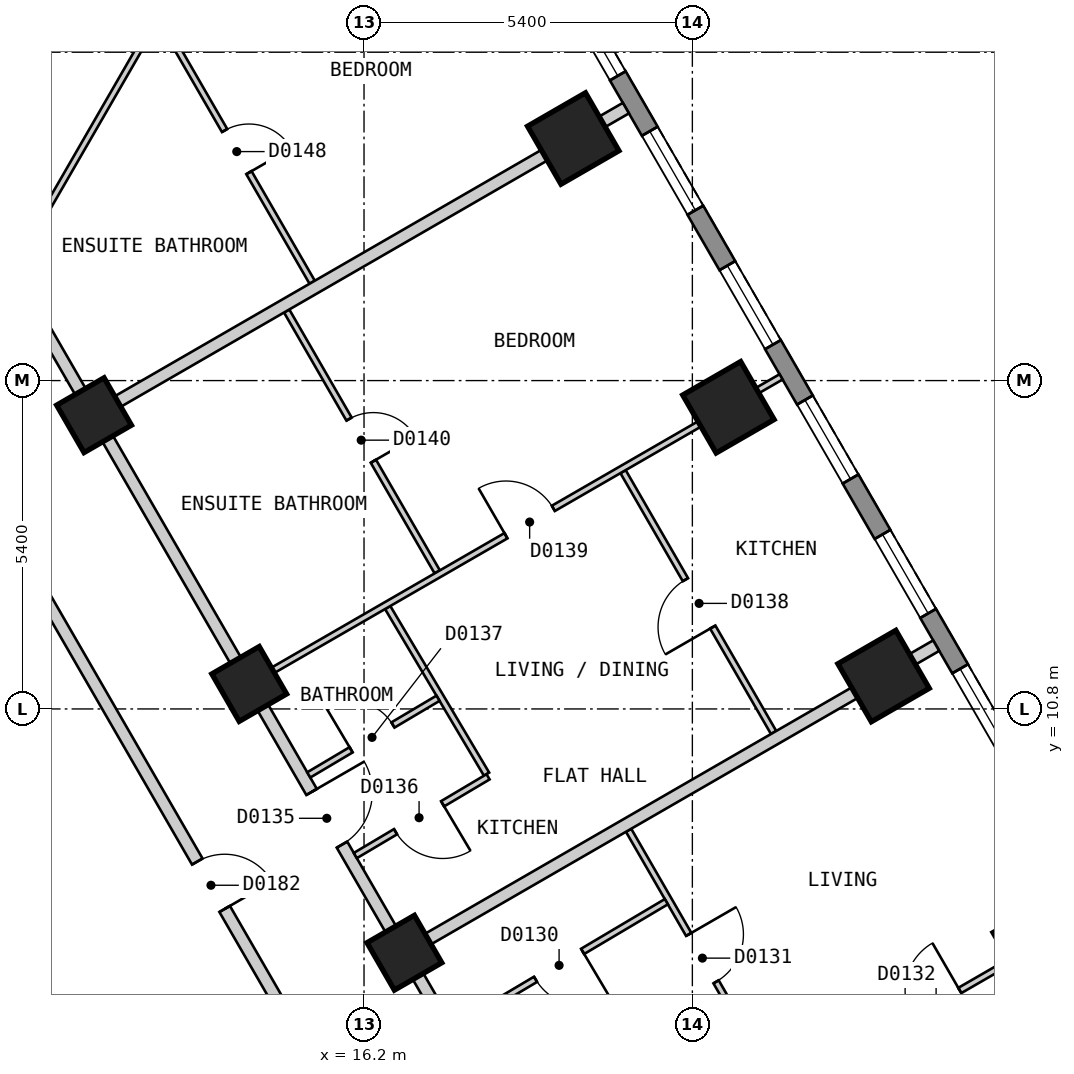
"""IFC4 building model, lengths in metres.
Left out: names, types, materials, properties, quantities, classifications, styles, units other than length and angle.
Written with IfcOpenShell. Run it as: python <this file> out.ifc"""

import sys

from ifc_helpers import new_model, si_unit, direction, frame, frame_2d, origin, origin_2d, place, context, subcontext, project, spatial, polyline, rectangle, outline, extrude, element, fill, save


model = new_model("IFC4")
c1 = context("Model", 3, precision=1e-05, world=origin(), true_north=direction((0.0, 1.0)))
c2 = subcontext(c1, "Body", "Model", "MODEL_VIEW")
j1 = project(units=[si_unit("LENGTHUNIT", "METRE"), si_unit("PLANEANGLEUNIT", "RADIAN")], contexts=[c1])
p1 = place(None, origin())
s1 = spatial("IfcSite", under=j1, at=p1, CompositionType="ELEMENT")
p2 = place(p1, origin())
s2 = spatial("IfcBuilding", under=s1, at=p2, CompositionType="ELEMENT")
p3 = place(p2, frame((0.0, 0.0, 29.4)))
s3 = spatial("IfcBuildingStorey", under=s2, at=p3, CompositionType="ELEMENT", Elevation=29.4)
for number, where, z_axis, x_axis in (
    (1, (27.297, 6.921, 0.0), (0.0, 0.0, 1.0), (-0.5, 0.866, 0.0)),
    (2, (24.745, 11.341, 0.0), (0.0, 0.0, 1.0), (-0.5, 0.866, 0.0)),
    (3, (22.193, 15.761, 0.0), (0.0, 0.0, 1.0), (-0.5, 0.866, 0.0)),
    (4, (19.641, 20.181, 0.0), (0.0, 0.0, 1.0), (-0.5, 0.866, 0.0)),
):
    element("IfcColumn", number, at=place(p3, frame(where, z_axis=z_axis, x_axis=x_axis)), inside=s3, PredefinedType="COLUMN", context=c2, shape_type="SweptSolid", body=[
        extrude(rectangle(XDim=1.1, YDim=1.1, at=origin_2d()), origin(), (0.0, 0.0, 1.0), 3.0),
    ])
for number, where, z_axis, x_axis in (
    (5, (16.864, 6.791, 0.0), (0.0, 0.0, 1.0), (-0.5, 0.866, 0.0)),
    (6, (14.312, 11.211, 0.0), (0.0, 0.0, 1.0), (-0.5, 0.866, 0.0)),
    (7, (11.76, 15.631, 0.0), (0.0, 0.0, 1.0), (-0.5, 0.866, 0.0)),
):
    element("IfcColumn", number, at=place(p3, frame(where, z_axis=z_axis, x_axis=x_axis)), inside=s3, PredefinedType="COLUMN", context=c2, shape_type="SweptSolid", body=[
        extrude(rectangle(XDim=0.9, YDim=0.9, at=origin_2d()), origin(), (0.0, 0.0, 1.0), 3.0),
    ])
p4 = place(p3, frame((31.22, 2.425, 0.0), z_axis=(0.0, 0.0, 1.0), x_axis=(-0.500001938803, 0.866024284413, 0.0)))
e8 = element("IfcWall", 8, at=p4, inside=s3, PredefinedType="SOLIDWALL", context=c2, shape_type="SweptSolid", body=[
    extrude(outline(polyline([(0.0, -0.15), (27.02, -0.15), (26.94, 0.15), (0.08, 0.15), (0.0, -0.15)])), origin(), (0.0, 0.0, 1.0), 2.7),
])
p5 = place(p4, frame((1.277, 0.0, 0.15)))
e9 = element("IfcOpeningElement", 9, at=p5, cuts=e8, PredefinedType="OPENING", context=c2, shape_type="SweptSolid", body=[
    extrude(rectangle(XDim=1.5, YDim=2.1, at=frame_2d((0.75, 1.05))), frame((0.0, 0.16, 0.0), z_axis=(0.0, -1.0, 0.0), x_axis=(1.0, 0.0, 0.0)), (0.0, 0.0, 1.0), 0.32),
])
p6 = place(p4, frame((3.829, 0.0, 0.15)))
e10 = element("IfcOpeningElement", 10, at=p6, cuts=e8, PredefinedType="OPENING", context=c2, shape_type="SweptSolid", body=[
    extrude(rectangle(XDim=1.5, YDim=2.1, at=frame_2d((0.75, 1.05))), frame((0.0, 0.16, 0.0), z_axis=(0.0, -1.0, 0.0), x_axis=(1.0, 0.0, 0.0)), (0.0, 0.0, 1.0), 0.32),
])
p7 = place(p4, frame((6.382, 0.0, 0.15)))
e11 = element("IfcOpeningElement", 11, at=p7, cuts=e8, PredefinedType="OPENING", context=c2, shape_type="SweptSolid", body=[
    extrude(rectangle(XDim=1.5, YDim=2.1, at=frame_2d((0.75, 1.05))), frame((0.0, 0.16, 0.0), z_axis=(0.0, -1.0, 0.0), x_axis=(1.0, 0.0, 0.0)), (0.0, 0.0, 1.0), 0.32),
])
p8 = place(p4, frame((8.933, 0.0, 0.15)))
e12 = element("IfcOpeningElement", 12, at=p8, cuts=e8, PredefinedType="OPENING", context=c2, shape_type="SweptSolid", body=[
    extrude(rectangle(XDim=1.5, YDim=2.1, at=frame_2d((0.75, 1.05))), frame((0.0, 0.16, 0.0), z_axis=(0.0, -1.0, 0.0), x_axis=(1.0, 0.0, 0.0)), (0.0, 0.0, 1.0), 0.32),
])
p9 = place(p4, frame((11.485, 0.0, 0.15)))
e13 = element("IfcOpeningElement", 13, at=p9, cuts=e8, PredefinedType="OPENING", context=c2, shape_type="SweptSolid", body=[
    extrude(rectangle(XDim=1.5, YDim=2.1, at=frame_2d((0.75, 1.05))), frame((0.0, 0.16, 0.0), z_axis=(0.0, -1.0, 0.0), x_axis=(1.0, 0.0, 0.0)), (0.0, 0.0, 1.0), 0.32),
])
p10 = place(p4, frame((14.037, 0.0, 0.15)))
e14 = element("IfcOpeningElement", 14, at=p10, cuts=e8, PredefinedType="OPENING", context=c2, shape_type="SweptSolid", body=[
    extrude(rectangle(XDim=1.5, YDim=2.1, at=frame_2d((0.75, 1.05))), frame((0.0, 0.16, 0.0), z_axis=(0.0, -1.0, 0.0), x_axis=(1.0, 0.0, 0.0)), (0.0, 0.0, 1.0), 0.32),
])
p11 = place(p4, frame((16.589, 0.0, 0.15)))
e15 = element("IfcOpeningElement", 15, at=p11, cuts=e8, PredefinedType="OPENING", context=c2, shape_type="SweptSolid", body=[
    extrude(rectangle(XDim=1.5, YDim=2.1, at=frame_2d((0.75, 1.05))), frame((0.0, 0.16, 0.0), z_axis=(0.0, -1.0, 0.0), x_axis=(1.0, 0.0, 0.0)), (0.0, 0.0, 1.0), 0.32),
])
p12 = place(p4, frame((19.141, 0.0, 0.15)))
e16 = element("IfcOpeningElement", 16, at=p12, cuts=e8, PredefinedType="OPENING", context=c2, shape_type="SweptSolid", body=[
    extrude(rectangle(XDim=1.5, YDim=2.1, at=frame_2d((0.75, 1.05))), frame((0.0, 0.16, 0.0), z_axis=(0.0, -1.0, 0.0), x_axis=(1.0, 0.0, 0.0)), (0.0, 0.0, 1.0), 0.32),
])
p13 = place(p4, frame((21.693, 0.0, 0.15)))
e17 = element("IfcOpeningElement", 17, at=p13, cuts=e8, PredefinedType="OPENING", context=c2, shape_type="SweptSolid", body=[
    extrude(rectangle(XDim=1.5, YDim=2.1, at=frame_2d((0.75, 1.05))), frame((0.0, 0.16, 0.0), z_axis=(0.0, -1.0, 0.0), x_axis=(1.0, 0.0, 0.0)), (0.0, 0.0, 1.0), 0.32),
])
p14 = place(p4, frame((24.244, 0.0, 0.15)))
e18 = element("IfcOpeningElement", 18, at=p14, cuts=e8, PredefinedType="OPENING", context=c2, shape_type="SweptSolid", body=[
    extrude(rectangle(XDim=1.5, YDim=2.1, at=frame_2d((0.75, 1.05))), frame((0.0, 0.16, 0.0), z_axis=(0.0, -1.0, 0.0), x_axis=(1.0, 0.0, 0.0)), (0.0, 0.0, 1.0), 0.32),
])
p15 = place(p3, frame((9.18, 15.7, 0.0), z_axis=(0.0, 0.0, 1.0), x_axis=(0.500003652032, -0.866023295272, 0.0)))
e19 = element("IfcWall", 19, at=p15, inside=s3, PredefinedType="PARTITIONING", context=c2, shape_type="SweptSolid", body=[
    extrude(rectangle(XDim=18.012, YDim=0.2, at=frame_2d((9.006, 0.0))), origin(), (0.0, 0.0, 1.0), 2.7),
])
p16 = place(p15, frame((8.556, 0.0, 0.0)))
e20 = element("IfcOpeningElement", 20, at=p16, cuts=e19, PredefinedType="OPENING", context=c2, shape_type="SweptSolid", body=[
    extrude(rectangle(XDim=0.9, YDim=2.1, at=frame_2d((0.45, 1.05))), frame((0.0, 0.11, 0.0), z_axis=(0.0, -1.0, 0.0), x_axis=(1.0, 0.0, 0.0)), (0.0, 0.0, 1.0), 0.22),
])
p17 = place(p3, frame((10.45, 17.9, 0.0), z_axis=(0.0, 0.0, 1.0), x_axis=(0.500034352617, -0.866005569383, 0.0)))
e21 = element("IfcWall", 21, at=p17, inside=s3, PredefinedType="PARTITIONING", context=c2, shape_type="SweptSolid", body=[
    extrude(rectangle(XDim=20.553, YDim=0.2, at=frame_2d((10.276, 0.0))), origin(), (0.0, 0.0, 1.0), 2.7),
])
p18 = place(p17, frame((14.903, 0.0, 0.0)))
e22 = element("IfcOpeningElement", 22, at=p18, cuts=e21, PredefinedType="OPENING", context=c2, shape_type="SweptSolid", body=[
    extrude(rectangle(XDim=1.0, YDim=2.1, at=frame_2d((0.5, 1.05))), frame((0.0, 0.11, 0.0), z_axis=(0.0, -1.0, 0.0), x_axis=(1.0, 0.0, 0.0)), (0.0, 0.0, 1.0), 0.22),
])
p19 = place(p17, frame((9.775, 0.0, 0.0)))
e23 = element("IfcOpeningElement", 23, at=p19, cuts=e21, PredefinedType="OPENING", context=c2, shape_type="SweptSolid", body=[
    extrude(rectangle(XDim=1.0, YDim=2.1, at=frame_2d((0.5, 1.05))), frame((0.0, 0.11, 0.0), z_axis=(0.0, -1.0, 0.0), x_axis=(1.0, 0.0, 0.0)), (0.0, 0.0, 1.0), 0.22),
])
p20 = place(p3, frame((16.589, 12.468, 0.0), z_axis=(0.0, 0.0, 1.0), x_axis=(0.510331599186, -0.859977708358, 0.0)))
e24 = element("IfcWall", 24, at=p20, inside=s3, PredefinedType="PARTITIONING", context=c2, shape_type="SweptSolid", body=[
    extrude(rectangle(XDim=3.186, YDim=0.1, at=frame_2d((1.593, 0.0))), origin(), (0.0, 0.0, 1.0), 2.7),
])
p21 = place(p3, frame((14.928, 17.344, 0.0), z_axis=(0.0, 0.0, 1.0), x_axis=(0.499881743012, -0.866093668724, 0.0)))
e25 = element("IfcWall", 25, at=p21, inside=s3, PredefinedType="PARTITIONING", context=c2, shape_type="SweptSolid", body=[
    extrude(rectangle(XDim=4.953, YDim=0.1, at=frame_2d((2.477, 0.0))), origin(), (0.0, 0.0, 1.0), 2.7),
])
p22 = place(p21, frame((2.052, 0.0, 0.0)))
e26 = element("IfcOpeningElement", 26, at=p22, cuts=e25, PredefinedType="OPENING", context=c2, shape_type="SweptSolid", body=[
    extrude(rectangle(XDim=0.8, YDim=2.1, at=frame_2d((0.4, 1.05))), frame((0.0, 0.06, 0.0), z_axis=(0.0, -1.0, 0.0), x_axis=(1.0, 0.0, 0.0)), (0.0, 0.0, 1.0), 0.12),
])
p23 = place(p3, frame((12.846, 22.15, 0.0), z_axis=(0.0, 0.0, 1.0), x_axis=(0.500002715276, -0.866023836113, 0.0)))
e27 = element("IfcWall", 27, at=p23, inside=s3, PredefinedType="PARTITIONING", context=c2, shape_type="SweptSolid", body=[
    extrude(rectangle(XDim=5.002, YDim=0.1, at=frame_2d((2.501, 0.0))), origin(), (0.0, 0.0, 1.0), 2.7),
])
p24 = place(p23, frame((2.122, 0.0, 0.0)))
e28 = element("IfcOpeningElement", 28, at=p24, cuts=e27, PredefinedType="OPENING", context=c2, shape_type="SweptSolid", body=[
    extrude(rectangle(XDim=0.8, YDim=2.1, at=frame_2d((0.4, 1.05))), frame((0.0, 0.06, 0.0), z_axis=(0.0, -1.0, 0.0), x_axis=(1.0, 0.0, 0.0)), (0.0, 0.0, 1.0), 0.12),
])
p25 = place(p3, frame((20.551, 8.805, 0.0), z_axis=(0.0, 0.0, 1.0), x_axis=(0.499984387913, -0.86603441724, 0.0)))
e29 = element("IfcWall", 29, at=p25, inside=s3, PredefinedType="PARTITIONING", context=c2, shape_type="SweptSolid", body=[
    extrude(rectangle(XDim=10.058, YDim=0.1, at=frame_2d((5.029, 0.0))), origin(), (0.0, 0.0, 1.0), 2.7),
])
p26 = place(p25, frame((1.978, 0.0, 0.0)))
e30 = element("IfcOpeningElement", 30, at=p26, cuts=e29, PredefinedType="OPENING", context=c2, shape_type="SweptSolid", body=[
    extrude(rectangle(XDim=0.9, YDim=2.1, at=frame_2d((0.45, 1.05))), frame((0.0, 0.06, 0.0), z_axis=(0.0, -1.0, 0.0), x_axis=(1.0, 0.0, 0.0)), (0.0, 0.0, 1.0), 0.12),
])
p27 = place(p25, frame((7.157, 0.0, 0.0)))
e31 = element("IfcOpeningElement", 31, at=p27, cuts=e29, PredefinedType="OPENING", context=c2, shape_type="SweptSolid", body=[
    extrude(rectangle(XDim=0.8, YDim=2.1, at=frame_2d((0.4, 1.05))), frame((0.0, 0.06, 0.0), z_axis=(0.0, -1.0, 0.0), x_axis=(1.0, 0.0, 0.0)), (0.0, 0.0, 1.0), 0.12),
])
p28 = place(p3, frame((20.46, 14.703, 0.0), z_axis=(0.0, 0.0, 1.0), x_axis=(0.499903082856, -0.866081351693, 0.0)))
e32 = element("IfcWall", 32, at=p28, inside=s3, PredefinedType="PARTITIONING", context=c2, shape_type="SweptSolid", body=[
    extrude(rectangle(XDim=4.953, YDim=0.1, at=frame_2d((2.477, 0.0))), origin(), (0.0, 0.0, 1.0), 2.7),
])
p29 = place(p28, frame((2.052, 0.0, 0.0)))
e33 = element("IfcOpeningElement", 33, at=p29, cuts=e32, PredefinedType="OPENING", context=c2, shape_type="SweptSolid", body=[
    extrude(rectangle(XDim=0.9, YDim=2.1, at=frame_2d((0.45, 1.05))), frame((0.0, 0.06, 0.0), z_axis=(0.0, -1.0, 0.0), x_axis=(1.0, 0.0, 0.0)), (0.0, 0.0, 1.0), 0.12),
])
p30 = place(p3, frame((10.393, 18.0, 0.0), z_axis=(0.0, 0.0, 1.0), x_axis=(0.499945497007, 0.866056868816, 0.0)))
e34 = element("IfcWall", 34, at=p30, inside=s3, PredefinedType="PARTITIONING", context=c2, shape_type="SweptSolid", body=[
    extrude(rectangle(XDim=10.265, YDim=0.1, at=frame_2d((5.132, 0.0))), origin(), (0.0, 0.0, 1.0), 2.7),
])
p31 = place(p30, frame((7.108, 0.0, 0.0)))
e35 = element("IfcOpeningElement", 35, at=p31, cuts=e34, PredefinedType="OPENING", context=c2, shape_type="SweptSolid", body=[
    extrude(rectangle(XDim=0.9, YDim=2.1, at=frame_2d((0.45, 1.05))), frame((0.0, 0.06, 0.0), z_axis=(0.0, -1.0, 0.0), x_axis=(1.0, 0.0, 0.0)), (0.0, 0.0, 1.0), 0.12),
])
p32 = place(p3, frame((14.399, 11.261, 0.0), z_axis=(0.0, 0.0, 1.0), x_axis=(0.866022959057, 0.500004234368, 0.0)))
e36 = element("IfcWall", 36, at=p32, inside=s3, PredefinedType="PARTITIONING", context=c2, shape_type="SweptSolid", body=[
    extrude(rectangle(XDim=10.0, YDim=0.1, at=frame_2d((5.0, 0.0))), origin(), (0.0, 0.0, 1.0), 2.7),
])
p33 = place(p32, frame((4.775, 0.0, 0.0)))
e37 = element("IfcOpeningElement", 37, at=p33, cuts=e36, PredefinedType="OPENING", context=c2, shape_type="SweptSolid", body=[
    extrude(rectangle(XDim=0.9, YDim=2.1, at=frame_2d((0.45, 1.05))), frame((0.0, 0.06, 0.0), z_axis=(0.0, -1.0, 0.0), x_axis=(1.0, 0.0, 0.0)), (0.0, 0.0, 1.0), 0.12),
])
p34 = place(p3, frame((17.688, 5.563, 0.0), z_axis=(0.0, 0.0, 1.0), x_axis=(0.860050619918, 0.510208713351, 0.0)))
e38 = element("IfcWall", 38, at=p34, inside=s3, PredefinedType="PARTITIONING", context=c2, shape_type="SweptSolid", body=[
    extrude(rectangle(XDim=4.051, YDim=0.1, at=frame_2d((2.025, 0.0))), origin(), (0.0, 0.0, 1.0), 2.7),
])
p35 = place(p34, frame((1.55, 0.0, 0.0)))
e39 = element("IfcOpeningElement", 39, at=p35, cuts=e38, PredefinedType="OPENING", context=c2, shape_type="SweptSolid", body=[
    extrude(rectangle(XDim=0.9, YDim=2.1, at=frame_2d((0.45, 1.05))), frame((0.0, 0.06, 0.0), z_axis=(0.0, -1.0, 0.0), x_axis=(1.0, 0.0, 0.0)), (0.0, 0.0, 1.0), 0.12),
])
p36 = place(p3, frame((16.057, 8.389, 0.0), z_axis=(0.0, 0.0, 1.0), x_axis=(0.860036770423, 0.510232058499, 0.0)))
e40 = element("IfcWall", 40, at=p36, inside=s3, PredefinedType="PARTITIONING", context=c2, shape_type="SweptSolid", body=[
    extrude(rectangle(XDim=2.538, YDim=0.1, at=frame_2d((1.269, 0.0))), origin(), (0.0, 0.0, 1.0), 2.7),
])
p37 = place(p36, frame((0.769, 0.0, 0.0)))
e41 = element("IfcOpeningElement", 41, at=p37, cuts=e40, PredefinedType="OPENING", context=c2, shape_type="SweptSolid", body=[
    extrude(rectangle(XDim=0.9, YDim=2.1, at=frame_2d((0.45, 1.05))), frame((0.0, 0.06, 0.0), z_axis=(0.0, -1.0, 0.0), x_axis=(1.0, 0.0, 0.0)), (0.0, 0.0, 1.0), 0.12),
])
p38 = place(p3, frame((15.291, 9.715, 0.0), z_axis=(0.0, 0.0, 1.0), x_axis=(0.860087708271, 0.510146188932, 0.0)))
e42 = element("IfcWall", 42, at=p38, inside=s3, PredefinedType="PARTITIONING", context=c2, shape_type="SweptSolid", body=[
    extrude(rectangle(XDim=2.472, YDim=0.1, at=frame_2d((1.236, 0.0))), origin(), (0.0, 0.0, 1.0), 2.7),
])
p39 = place(p38, frame((0.81, 0.0, 0.0)))
e43 = element("IfcOpeningElement", 43, at=p39, cuts=e42, PredefinedType="OPENING", context=c2, shape_type="SweptSolid", body=[
    extrude(rectangle(XDim=0.8, YDim=2.1, at=frame_2d((0.4, 1.05))), frame((0.0, 0.06, 0.0), z_axis=(0.0, -1.0, 0.0), x_axis=(1.0, 0.0, 0.0)), (0.0, 0.0, 1.0), 0.12),
])
for number, where, z_axis, x_axis in (
    (44, (16.95, 6.841, 0.0), (0.0, 0.0, 1.0), (0.866, 0.5, 0.0)),
    (45, (11.847, 15.681, 0.0), (0.0, 0.0, 1.0), (0.866, 0.5, 0.0)),
):
    element("IfcWall", number, at=place(p3, frame(where, z_axis=z_axis, x_axis=x_axis)), inside=s3, PredefinedType="PARTITIONING", context=c2, shape_type="SweptSolid", body=[
        extrude(rectangle(XDim=10.0, YDim=0.2, at=frame_2d((5.0, 0.0))), origin(), (0.0, 0.0, 1.0), 2.7),
    ])
p40 = place(p3, frame((23.053, 4.47, 0.0), z_axis=(0.0, 0.0, 1.0), x_axis=(0.866052608538, 0.499952877023, 0.0)))
e46 = element("IfcWall", 46, at=p40, inside=s3, PredefinedType="PARTITIONING", context=c2, shape_type="SweptSolid", body=[
    extrude(rectangle(XDim=5.9, YDim=0.1, at=frame_2d((2.95, 0.0))), origin(), (0.0, 0.0, 1.0), 2.7),
])
p41 = place(p40, frame((2.501, 0.0, 0.0)))
e47 = element("IfcOpeningElement", 47, at=p41, cuts=e46, PredefinedType="OPENING", context=c2, shape_type="SweptSolid", body=[
    extrude(rectangle(XDim=0.9, YDim=2.1, at=frame_2d((0.45, 1.05))), frame((0.0, 0.06, 0.0), z_axis=(0.0, -1.0, 0.0), x_axis=(1.0, 0.0, 0.0)), (0.0, 0.0, 1.0), 0.12),
])
p42 = place(p8, origin())
e48 = element("IfcWindow", 48, at=p42, inside=s3, PartitioningType="SINGLE_PANEL", PredefinedType="WINDOW", context=c2, shape_type="SweptSolid", body=[
    extrude(rectangle(XDim=1.5, YDim=2.1, at=frame_2d((0.75, 1.05))), frame((0.0, 0.03, 0.0), z_axis=(0.0, -1.0, 0.0), x_axis=(1.0, 0.0, 0.0)), (0.0, 0.0, 1.0), 0.06),
])
fill(e12, e48)
p43 = place(p9, origin())
e49 = element("IfcWindow", 49, at=p43, inside=s3, PartitioningType="SINGLE_PANEL", PredefinedType="WINDOW", context=c2, shape_type="SweptSolid", body=[
    extrude(rectangle(XDim=1.5, YDim=2.1, at=frame_2d((0.75, 1.05))), frame((0.0, 0.03, 0.0), z_axis=(0.0, -1.0, 0.0), x_axis=(1.0, 0.0, 0.0)), (0.0, 0.0, 1.0), 0.06),
])
fill(e13, e49)
p44 = place(p10, origin())
e50 = element("IfcWindow", 50, at=p44, inside=s3, PartitioningType="SINGLE_PANEL", PredefinedType="WINDOW", context=c2, shape_type="SweptSolid", body=[
    extrude(rectangle(XDim=1.5, YDim=2.1, at=frame_2d((0.75, 1.05))), frame((0.0, 0.03, 0.0), z_axis=(0.0, -1.0, 0.0), x_axis=(1.0, 0.0, 0.0)), (0.0, 0.0, 1.0), 0.06),
])
fill(e14, e50)
p45 = place(p11, origin())
e51 = element("IfcWindow", 51, at=p45, inside=s3, PartitioningType="SINGLE_PANEL", PredefinedType="WINDOW", context=c2, shape_type="SweptSolid", body=[
    extrude(rectangle(XDim=1.5, YDim=2.1, at=frame_2d((0.75, 1.05))), frame((0.0, 0.03, 0.0), z_axis=(0.0, -1.0, 0.0), x_axis=(1.0, 0.0, 0.0)), (0.0, 0.0, 1.0), 0.06),
])
fill(e15, e51)
p46 = place(p12, origin())
e52 = element("IfcWindow", 52, at=p46, inside=s3, PartitioningType="SINGLE_PANEL", PredefinedType="WINDOW", context=c2, shape_type="SweptSolid", body=[
    extrude(rectangle(XDim=1.5, YDim=2.1, at=frame_2d((0.75, 1.05))), frame((0.0, 0.03, 0.0), z_axis=(0.0, -1.0, 0.0), x_axis=(1.0, 0.0, 0.0)), (0.0, 0.0, 1.0), 0.06),
])
fill(e16, e52)
p47 = place(p13, origin())
e53 = element("IfcWindow", 53, at=p47, inside=s3, PartitioningType="SINGLE_PANEL", PredefinedType="WINDOW", context=c2, shape_type="SweptSolid", body=[
    extrude(rectangle(XDim=1.5, YDim=2.1, at=frame_2d((0.75, 1.05))), frame((0.0, 0.03, 0.0), z_axis=(0.0, -1.0, 0.0), x_axis=(1.0, 0.0, 0.0)), (0.0, 0.0, 1.0), 0.06),
])
fill(e17, e53)
p48 = place(p35, origin())
e54 = element("IfcDoor", 54, at=p48, inside=s3, OperationType="SINGLE_SWING_RIGHT", PredefinedType="DOOR", context=c2, shape_type="SweptSolid", body=[
    extrude(rectangle(XDim=0.9, YDim=2.1, at=frame_2d((0.45, 1.05))), frame((0.0, 0.025, 0.0), z_axis=(0.0, -1.0, 0.0), x_axis=(1.0, 0.0, 0.0)), (0.0, 0.0, 1.0), 0.05),
])
fill(e39, e54)
p49 = place(p26, origin())
e55 = element("IfcDoor", 55, at=p49, inside=s3, OperationType="SINGLE_SWING_LEFT", PredefinedType="DOOR", context=c2, shape_type="SweptSolid", body=[
    extrude(rectangle(XDim=0.9, YDim=2.1, at=frame_2d((0.45, 1.05))), frame((0.0, 0.025, 0.0), z_axis=(0.0, -1.0, 0.0), x_axis=(1.0, 0.0, 0.0)), (0.0, 0.0, 1.0), 0.05),
])
fill(e30, e55)
p50 = place(p41, origin())
e56 = element("IfcDoor", 56, at=p50, inside=s3, OperationType="SINGLE_SWING_RIGHT", PredefinedType="DOOR", context=c2, shape_type="SweptSolid", body=[
    extrude(rectangle(XDim=0.9, YDim=2.1, at=frame_2d((0.45, 1.05))), frame((0.0, 0.025, 0.0), z_axis=(0.0, -1.0, 0.0), x_axis=(1.0, 0.0, 0.0)), (0.0, 0.0, 1.0), 0.05),
])
fill(e47, e56)
p51 = place(p19, origin())
e57 = element("IfcDoor", 57, at=p51, inside=s3, OperationType="SINGLE_SWING_LEFT", PredefinedType="DOOR", context=c2, shape_type="SweptSolid", body=[
    extrude(rectangle(XDim=1.0, YDim=2.1, at=frame_2d((0.5, 1.05))), frame((0.0, 0.025, 0.0), z_axis=(0.0, -1.0, 0.0), x_axis=(1.0, 0.0, 0.0)), (0.0, 0.0, 1.0), 0.05),
])
fill(e23, e57)
p52 = place(p37, origin())
e58 = element("IfcDoor", 58, at=p52, inside=s3, OperationType="SINGLE_SWING_RIGHT", PredefinedType="DOOR", context=c2, shape_type="SweptSolid", body=[
    extrude(rectangle(XDim=0.9, YDim=2.1, at=frame_2d((0.45, 1.05))), frame((0.0, 0.025, 0.0), z_axis=(0.0, -1.0, 0.0), x_axis=(1.0, 0.0, 0.0)), (0.0, 0.0, 1.0), 0.05),
])
fill(e41, e58)
p53 = place(p39, origin())
e59 = element("IfcDoor", 59, at=p53, inside=s3, OperationType="SINGLE_SWING_LEFT", PredefinedType="DOOR", context=c2, shape_type="SweptSolid", body=[
    extrude(rectangle(XDim=0.8, YDim=2.1, at=frame_2d((0.4, 1.05))), frame((0.0, 0.025, 0.0), z_axis=(0.0, -1.0, 0.0), x_axis=(1.0, 0.0, 0.0)), (0.0, 0.0, 1.0), 0.05),
])
fill(e43, e59)
p54 = place(p29, origin())
e60 = element("IfcDoor", 60, at=p54, inside=s3, OperationType="SINGLE_SWING_RIGHT", PredefinedType="DOOR", context=c2, shape_type="SweptSolid", body=[
    extrude(rectangle(XDim=0.9, YDim=2.1, at=frame_2d((0.45, 1.05))), frame((0.0, 0.025, 0.0), z_axis=(0.0, -1.0, 0.0), x_axis=(1.0, 0.0, 0.0)), (0.0, 0.0, 1.0), 0.05),
])
fill(e33, e60)
p55 = place(p33, origin())
e61 = element("IfcDoor", 61, at=p55, inside=s3, OperationType="SINGLE_SWING_LEFT", PredefinedType="DOOR", context=c2, shape_type="SweptSolid", body=[
    extrude(rectangle(XDim=0.9, YDim=2.1, at=frame_2d((0.45, 1.05))), frame((0.0, 0.025, 0.0), z_axis=(0.0, -1.0, 0.0), x_axis=(1.0, 0.0, 0.0)), (0.0, 0.0, 1.0), 0.05),
])
fill(e37, e61)
p56 = place(p22, origin())
e62 = element("IfcDoor", 62, at=p56, inside=s3, OperationType="SINGLE_SWING_RIGHT", PredefinedType="DOOR", context=c2, shape_type="SweptSolid", body=[
    extrude(rectangle(XDim=0.8, YDim=2.1, at=frame_2d((0.4, 1.05))), frame((0.0, 0.025, 0.0), z_axis=(0.0, -1.0, 0.0), x_axis=(1.0, 0.0, 0.0)), (0.0, 0.0, 1.0), 0.05),
])
fill(e26, e62)
p57 = place(p24, origin())
e63 = element("IfcDoor", 63, at=p57, inside=s3, OperationType="SINGLE_SWING_RIGHT", PredefinedType="DOOR", context=c2, shape_type="SweptSolid", body=[
    extrude(rectangle(XDim=0.8, YDim=2.1, at=frame_2d((0.4, 1.05))), frame((0.0, 0.025, 0.0), z_axis=(0.0, -1.0, 0.0), x_axis=(1.0, 0.0, 0.0)), (0.0, 0.0, 1.0), 0.05),
])
fill(e28, e63)
p58 = place(p16, origin())
e64 = element("IfcDoor", 64, at=p58, inside=s3, OperationType="SINGLE_SWING_RIGHT", PredefinedType="DOOR", context=c2, shape_type="SweptSolid", body=[
    extrude(rectangle(XDim=0.9, YDim=2.1, at=frame_2d((0.45, 1.05))), frame((0.0, 0.025, 0.0), z_axis=(0.0, -1.0, 0.0), x_axis=(1.0, 0.0, 0.0)), (0.0, 0.0, 1.0), 0.05),
])
fill(e20, e64)
save(model, sys.argv[1])
